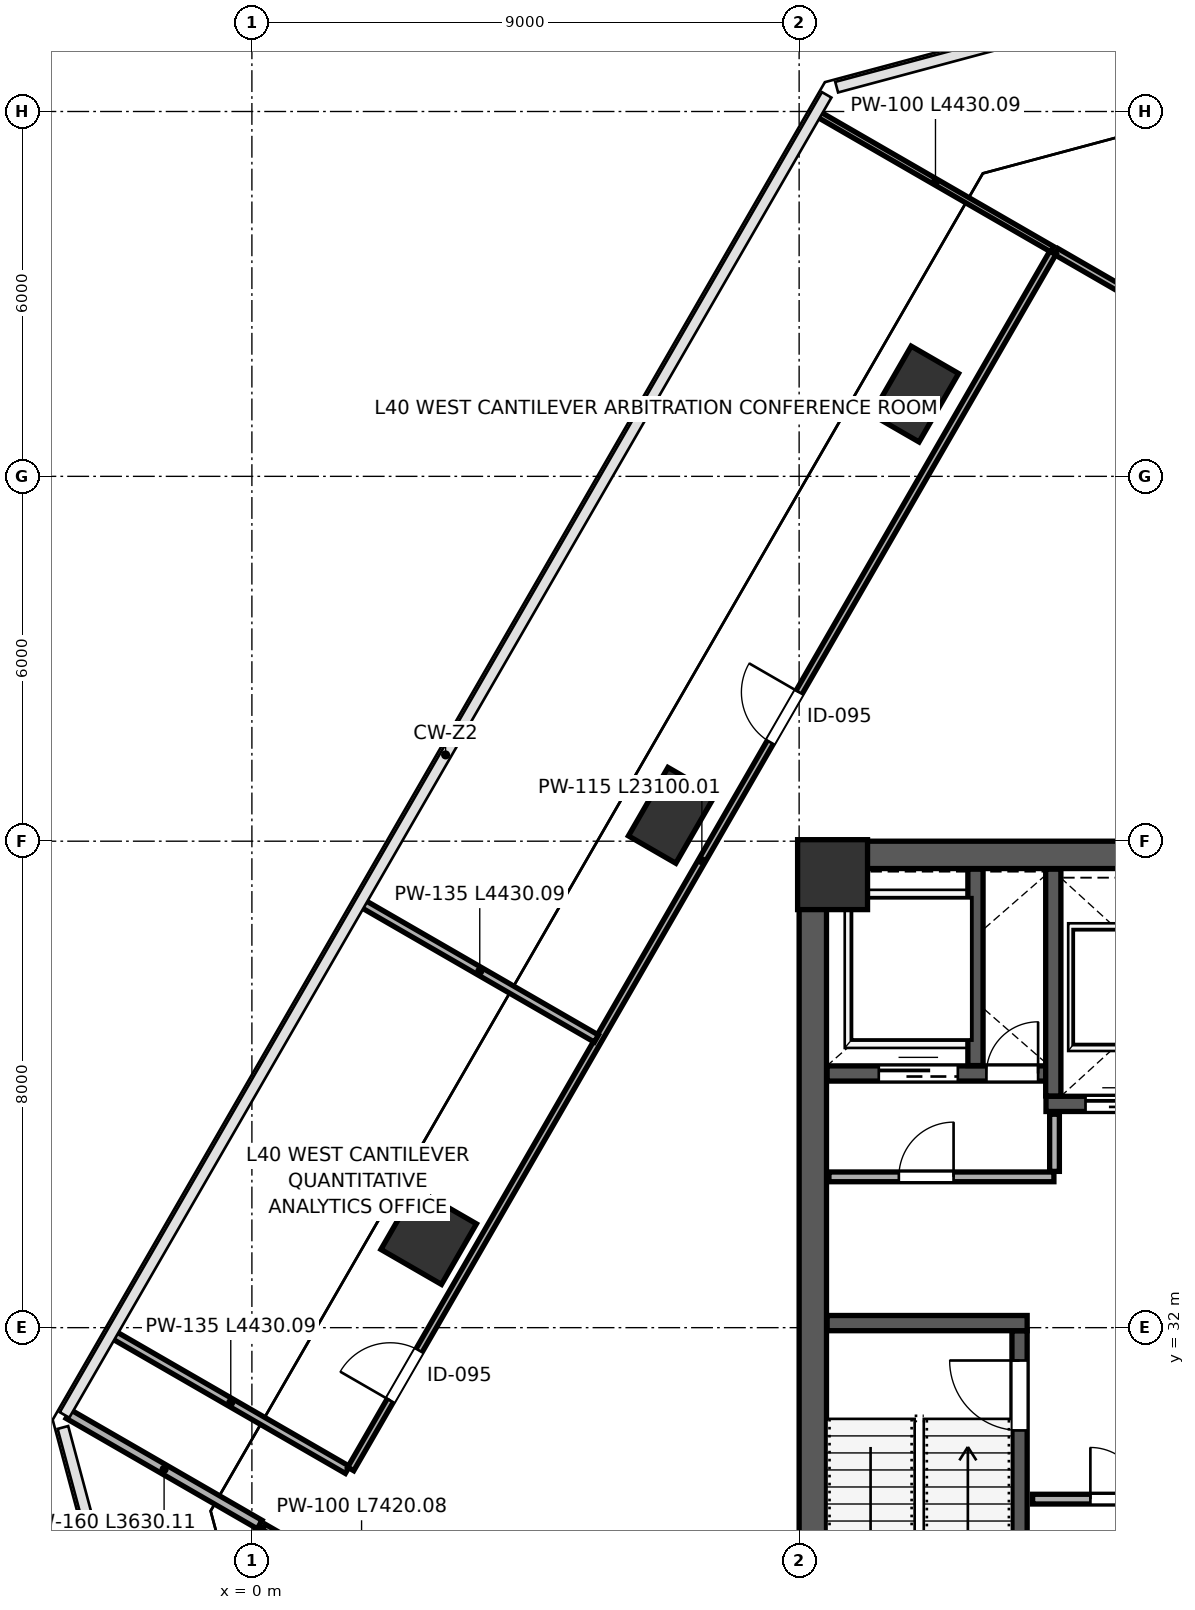
"""IFC4 building model, lengths in metres.
Left out: names, types, materials, properties, quantities, classifications, styles, units other than length and angle.
Written with IfcOpenShell. Run it as: python <this file> out.ifc"""

import sys

from ifc_helpers import new_model, si_unit, direction, frame, frame_2d, origin, origin_2d, place, context, subcontext, project, spatial, rectangle, extrude, source, transform, mapped, element, fill, save


model = new_model("IFC4")
c1 = context("Model", 3, precision=1e-05, world=origin(), true_north=direction((0.0, 1.0)))
c2 = subcontext(c1, "Body", "Model", "MODEL_VIEW")
j1 = project(units=[si_unit("LENGTHUNIT", "METRE"), si_unit("PLANEANGLEUNIT", "RADIAN")], contexts=[c1])
p1 = place(None, origin())
s1 = spatial("IfcSite", under=j1, at=p1, CompositionType="ELEMENT")
p2 = place(p1, origin())
s2 = spatial("IfcBuilding", under=s1, at=p2, CompositionType="ELEMENT")
p3 = place(p2, frame((0.0, 0.0, 179.2)))
s3 = spatial("IfcBuildingStorey", under=s2, at=p3, CompositionType="ELEMENT", Elevation=179.2)
m1 = source(origin(), c2, "Body", "SweptSolid", [
    extrude(rectangle(XDim=1.15, YDim=1.15, at=origin_2d()), origin(), (0.0, 0.0, 1.0), 4.198),
])
p4 = place(p3, frame((9.55, 39.45, 0.001), z_axis=(0.0, 0.0, 1.0), x_axis=(1.0, 0.0, 0.0)))
e1 = element("IfcColumn", 1, at=p4, inside=s3, PredefinedType="COLUMN", context=c2, shape_type="MappedRepresentation", body=[
    mapped(m1, transform((0.0, 0.0, 0.0), scale=1.0)),
])
m2 = source(origin(), c2, "Body", "SweptSolid", [
    extrude(rectangle(XDim=1.15, YDim=1.15, at=origin_2d()), origin(), (0.0, 0.0, 1.0), 4.198),
])
p5 = place(p3, frame((2.907, 33.497, 0.001), z_axis=(0.0, 0.0, 1.0), x_axis=(-0.866025403784, 0.5, 0.0)))
e2 = element("IfcColumn", 2, at=p5, inside=s3, PredefinedType="COLUMN", context=c2, shape_type="MappedRepresentation", body=[
    mapped(m2, transform((0.0, 0.0, 0.0), scale=1.0)),
])
m3 = source(origin(), c2, "Body", "SweptSolid", [
    extrude(rectangle(XDim=0.9, YDim=1.3, at=origin_2d()), origin(), (0.0, 0.0, 1.0), 4.198),
])
for number, where, z_axis, x_axis in (
    (3, (6.907, 40.425, 0.001), (0.0, 0.0, 1.0), (-0.866, 0.5, 0.0)),
    (4, (10.907, 47.353, 0.001), (0.0, 0.0, 1.0), (-0.866, 0.5, 0.0)),
):
    element("IfcColumn", number, at=place(p3, frame(where, z_axis=z_axis, x_axis=x_axis)), inside=s3, PredefinedType="PILASTER", context=c2, shape_type="MappedRepresentation", body=[
        mapped(m3, transform((0.0, 0.0, 0.0), scale=1.0)),
    ])
p6 = place(p3, frame((9.225, 24.45, 0.0), z_axis=(0.0, 0.0, 1.0), x_axis=(0.0, 1.0, 0.0)))
e5 = element("IfcWall", 5, at=p6, inside=s3, PredefinedType="SHEAR", context=c2, shape_type="SweptSolid", body=[
    extrude(rectangle(XDim=15.1, YDim=0.45, at=frame_2d((7.55, 0.0))), origin(), (0.0, 0.0, 1.0), 3.96),
])
p7 = place(p3, frame((9.0, 39.775, 0.0), z_axis=(0.0, 0.0, 1.0), x_axis=(1.0, 0.0, 0.0)))
e6 = element("IfcWall", 6, at=p7, inside=s3, PredefinedType="SHEAR", context=c2, shape_type="SweptSolid", body=[
    extrude(rectangle(XDim=18.0, YDim=0.45, at=frame_2d((9.0, 0.0))), origin(), (0.0, 0.0, 1.0), 3.96),
])
p8 = place(p3, frame((12.625, 24.46, 0.0), z_axis=(0.0, 0.0, 1.0), x_axis=(0.0, 1.0, 0.0)))
e7 = element("IfcWall", 7, at=p8, inside=s3, PredefinedType="SHEAR", context=c2, shape_type="SweptSolid", body=[
    extrude(rectangle(XDim=7.49, YDim=0.25, at=frame_2d((3.745, 0.0))), origin(), (0.0, 0.0, 1.0), 3.96),
])
p9 = place(p8, frame((5.85, 0.0, 0.0)))
e8 = element("IfcOpeningElement", 8, at=p9, cuts=e7, PredefinedType="OPENING", context=c2, shape_type="SweptSolid", body=[
    extrude(rectangle(XDim=1.15, YDim=2.2, at=frame_2d((0.575, 1.1))), frame((0.0, 0.135, 0.0), z_axis=(0.0, -1.0, 0.0), x_axis=(1.0, 0.0, 0.0)), (0.0, 0.0, 1.0), 0.27),
])
p10 = place(p3, frame((9.46, 32.075, 0.0), z_axis=(0.0, 0.0, 1.0), x_axis=(1.0, 0.0, 0.0)))
e9 = element("IfcWall", 9, at=p10, inside=s3, PredefinedType="SHEAR", context=c2, shape_type="SweptSolid", body=[
    extrude(rectangle(XDim=3.29, YDim=0.25, at=frame_2d((1.645, 0.0))), origin(), (0.0, 0.0, 1.0), 3.96),
])
p11 = place(p3, frame((9.46, 36.18, 0.0), z_axis=(0.0, 0.0, 1.0), x_axis=(1.0, 0.0, 0.0)))
e10 = element("IfcWall", 10, at=p11, inside=s3, PredefinedType="SHEAR", context=c2, shape_type="SweptSolid", body=[
    extrude(rectangle(XDim=3.79, YDim=0.25, at=frame_2d((1.895, 0.0))), origin(), (0.0, 0.0, 1.0), 3.96),
])
p12 = place(p11, frame((2.62, 0.0, 0.0)))
e11 = element("IfcOpeningElement", 11, at=p12, cuts=e10, PredefinedType="OPENING", context=c2, shape_type="SweptSolid", body=[
    extrude(rectangle(XDim=0.85, YDim=2.1, at=frame_2d((0.425, 1.05))), frame((0.0, 0.135, 0.0), z_axis=(0.0, -1.0, 0.0), x_axis=(1.0, 0.0, 0.0)), (0.0, 0.0, 1.0), 0.27),
])
p13 = place(p11, frame((0.85, 0.0, 0.0)))
e12 = element("IfcOpeningElement", 12, at=p13, cuts=e10, PredefinedType="OPENING", context=c2, shape_type="SweptSolid", body=[
    extrude(rectangle(XDim=1.3, YDim=2.25, at=frame_2d((0.65, 1.125))), frame((0.0, 0.135, 0.0), z_axis=(0.0, -1.0, 0.0), x_axis=(1.0, 0.0, 0.0)), (0.0, 0.0, 1.0), 0.27),
])
p14 = place(p3, frame((11.9, 36.31, 0.0), z_axis=(0.0, 0.0, 1.0), x_axis=(0.0, 1.0, 0.0)))
e13 = element("IfcWall", 13, at=p14, inside=s3, PredefinedType="SHEAR", context=c2, shape_type="SweptSolid", body=[
    extrude(rectangle(XDim=3.23, YDim=0.25, at=frame_2d((1.615, 0.0))), origin(), (0.0, 0.0, 1.0), 3.96),
])
p15 = place(p3, frame((13.06, 35.68, 0.0), z_axis=(0.0, 0.0, 1.0), x_axis=(1.0, 0.0, 0.0)))
e14 = element("IfcWall", 14, at=p15, inside=s3, PredefinedType="SHEAR", context=c2, shape_type="SweptSolid", body=[
    extrude(rectangle(XDim=4.25, YDim=0.25, at=frame_2d((2.125, 0.0))), origin(), (0.0, 0.0, 1.0), 3.96),
])
p16 = place(p15, frame((0.65, 0.0, 0.0)))
e15 = element("IfcOpeningElement", 15, at=p16, cuts=e14, PredefinedType="OPENING", context=c2, shape_type="SweptSolid", body=[
    extrude(rectangle(XDim=1.1, YDim=2.2, at=frame_2d((0.55, 1.1))), frame((0.0, 0.135, 0.0), z_axis=(0.0, -1.0, 0.0), x_axis=(1.0, 0.0, 0.0)), (0.0, 0.0, 1.0), 0.27),
])
p17 = place(p15, frame((2.65, 0.0, 0.0)))
e16 = element("IfcOpeningElement", 16, at=p17, cuts=e14, PredefinedType="OPENING", context=c2, shape_type="SweptSolid", body=[
    extrude(rectangle(XDim=1.1, YDim=2.2, at=frame_2d((0.55, 1.1))), frame((0.0, 0.135, 0.0), z_axis=(0.0, -1.0, 0.0), x_axis=(1.0, 0.0, 0.0)), (0.0, 0.0, 1.0), 0.27),
])
p18 = place(p3, frame((13.18, 35.81, 0.0), z_axis=(0.0, 0.0, 1.0), x_axis=(0.0, 1.0, 0.0)))
e17 = element("IfcWall", 17, at=p18, inside=s3, PredefinedType="SHEAR", context=c2, shape_type="SweptSolid", body=[
    extrude(rectangle(XDim=3.73, YDim=0.25, at=frame_2d((1.865, 0.0))), origin(), (0.0, 0.0, 1.0), 3.96),
])
p19 = place(p3, frame((9.49, 34.48, 0.0), z_axis=(0.0, 0.0, 1.0), x_axis=(1.0, 0.0, 0.0)))
e18 = element("IfcWall", 18, at=p19, inside=s3, PredefinedType="PARTITIONING", context=c2, shape_type="SweptSolid", body=[
    extrude(rectangle(XDim=3.7, YDim=0.16, at=frame_2d((1.85, 0.0))), origin(), (0.0, 0.0, 1.0), 3.96),
])
p20 = place(p19, frame((1.15, 0.0, 0.0)))
e19 = element("IfcOpeningElement", 19, at=p20, cuts=e18, PredefinedType="OPENING", context=c2, shape_type="SweptSolid", body=[
    extrude(rectangle(XDim=0.9, YDim=2.15, at=frame_2d((0.45, 1.075))), frame((0.0, 0.09, 0.0), z_axis=(0.0, -1.0, 0.0), x_axis=(1.0, 0.0, 0.0)), (0.0, 0.0, 1.0), 0.18),
])
p21 = place(p3, frame((13.2, 34.57, 0.0), z_axis=(0.0, 0.0, 1.0), x_axis=(0.0, 1.0, 0.0)))
e20 = element("IfcWall", 20, at=p21, inside=s3, PredefinedType="PARTITIONING", context=c2, shape_type="SweptSolid", body=[
    extrude(rectangle(XDim=0.94, YDim=0.16, at=frame_2d((0.47, 0.0))), origin(), (0.0, 0.0, 1.0), 3.96),
])
p22 = place(p3, frame((12.84, 29.18, 0.0), z_axis=(0.0, 0.0, 1.0), x_axis=(1.0, 0.0, 0.0)))
e21 = element("IfcWall", 21, at=p22, inside=s3, PredefinedType="PARTITIONING", context=c2, shape_type="SweptSolid", body=[
    extrude(rectangle(XDim=8.37, YDim=0.16, at=frame_2d((4.185, 0.0))), origin(), (0.0, 0.0, 1.0), 3.96),
])
p23 = place(p22, frame((0.95, 0.0, 0.0)))
e22 = element("IfcOpeningElement", 22, at=p23, cuts=e21, PredefinedType="OPENING", context=c2, shape_type="SweptSolid", body=[
    extrude(rectangle(XDim=0.85, YDim=2.1, at=frame_2d((0.425, 1.05))), frame((0.0, 0.09, 0.0), z_axis=(0.0, -1.0, 0.0), x_axis=(1.0, 0.0, 0.0)), (0.0, 0.0, 1.0), 0.18),
])
p24 = place(p22, frame((4.2, 0.0, 0.0)))
e23 = element("IfcOpeningElement", 23, at=p24, cuts=e21, PredefinedType="OPENING", context=c2, shape_type="SweptSolid", body=[
    extrude(rectangle(XDim=0.85, YDim=2.1, at=frame_2d((0.425, 1.05))), frame((0.0, 0.09, 0.0), z_axis=(0.0, -1.0, 0.0), x_axis=(1.0, 0.0, 0.0)), (0.0, 0.0, 1.0), 0.18),
])
p25 = place(p3, frame((-1.749, 25.432, 0.0), z_axis=(0.0, 0.0, 1.0), x_axis=(0.500013012896, 0.866017890655, 0.0)))
e24 = element("IfcWall", 24, at=p25, inside=s3, PredefinedType="PARTITIONING", context=c2, shape_type="SweptSolid", body=[
    extrude(rectangle(XDim=3.782, YDim=0.115, at=frame_2d((1.891, 0.0))), origin(), (0.0, 0.0, 1.0), 3.96),
])
p26 = place(p3, frame((-3.016, 30.577, 0.0), z_axis=(0.0, 0.0, 1.0), x_axis=(0.866011990707, -0.500023231413, 0.0)))
e25 = element("IfcWall", 25, at=p26, inside=s3, PredefinedType="PARTITIONING", context=c2, shape_type="SweptSolid", body=[
    extrude(rectangle(XDim=3.63, YDim=0.16, at=frame_2d((1.815, 0.0))), origin(), (0.0, 0.0, 1.0), 3.96),
])
p27 = place(p3, frame((0.197, 28.722, 0.0), z_axis=(0.0, 0.0, 1.0), x_axis=(0.866017374541, -0.5000139068, 0.0)))
e26 = element("IfcWall", 26, at=p27, inside=s3, PredefinedType="PARTITIONING", context=c2, shape_type="SweptSolid", body=[
    extrude(rectangle(XDim=7.42, YDim=0.1, at=frame_2d((3.71, 0.0))), origin(), (0.0, 0.0, 1.0), 3.96),
])
p28 = place(p27, frame((2.9, 0.0, 0.0)))
e27 = element("IfcOpeningElement", 27, at=p28, cuts=e26, PredefinedType="OPENING", context=c2, shape_type="SweptSolid", body=[
    extrude(rectangle(XDim=0.9, YDim=2.15, at=frame_2d((0.45, 1.075))), frame((0.0, 0.06, 0.0), z_axis=(0.0, -1.0, 0.0), x_axis=(1.0, 0.0, 0.0)), (0.0, 0.0, 1.0), 0.12),
])
p29 = place(p27, frame((5.0, 0.0, 0.0)))
e28 = element("IfcOpeningElement", 28, at=p29, cuts=e26, PredefinedType="OPENING", context=c2, shape_type="SweptSolid", body=[
    extrude(rectangle(XDim=0.95, YDim=2.15, at=frame_2d((0.475, 1.075))), frame((0.0, 0.06, 0.0), z_axis=(0.0, -1.0, 0.0), x_axis=(1.0, 0.0, 0.0)), (0.0, 0.0, 1.0), 0.12),
])
p30 = place(p3, frame((13.23, 49.696, 0.0), z_axis=(0.0, 0.0, 1.0), x_axis=(0.866026251752, -0.499998531275, 0.0)))
e29 = element("IfcWall", 29, at=p30, inside=s3, PredefinedType="PARTITIONING", context=c2, shape_type="SweptSolid", body=[
    extrude(rectangle(XDim=26.69, YDim=0.115, at=frame_2d((13.345, 0.0))), origin(), (0.0, 0.0, 1.0), 3.96),
])
p31 = place(p30, frame((2.1, 0.0, 0.0)))
e30 = element("IfcOpeningElement", 30, at=p31, cuts=e29, PredefinedType="OPENING", context=c2, shape_type="SweptSolid", body=[
    extrude(rectangle(XDim=0.95, YDim=2.15, at=frame_2d((0.475, 1.075))), frame((0.0, 0.067, 0.0), z_axis=(0.0, -1.0, 0.0), x_axis=(1.0, 0.0, 0.0)), (0.0, 0.0, 1.0), 0.135),
])
p32 = place(p30, frame((18.2, 0.0, 0.0)))
e31 = element("IfcOpeningElement", 31, at=p32, cuts=e29, PredefinedType="OPENING", context=c2, shape_type="SweptSolid", body=[
    extrude(rectangle(XDim=0.95, YDim=2.15, at=frame_2d((0.475, 1.075))), frame((0.0, 0.067, 0.0), z_axis=(0.0, -1.0, 0.0), x_axis=(1.0, 0.0, 0.0)), (0.0, 0.0, 1.0), 0.135),
])
p33 = place(p3, frame((-2.266, 31.876, 0.0), z_axis=(0.0, 0.0, 1.0), x_axis=(0.866026823135, -0.499997541604, 0.0)))
e32 = element("IfcWall", 32, at=p33, inside=s3, PredefinedType="PARTITIONING", context=c2, shape_type="SweptSolid", body=[
    extrude(rectangle(XDim=4.43, YDim=0.135, at=frame_2d((2.215, 0.0))), origin(), (0.0, 0.0, 1.0), 3.96),
])
p34 = place(p3, frame((1.625, 29.676, 0.0), z_axis=(0.0, 0.0, 1.0), x_axis=(0.500002707681, 0.866023840498, 0.0)))
e33 = element("IfcWall", 33, at=p34, inside=s3, PredefinedType="PARTITIONING", context=c2, shape_type="SweptSolid", body=[
    extrude(rectangle(XDim=23.1, YDim=0.115, at=frame_2d((11.55, 0.0))), origin(), (0.0, 0.0, 1.0), 3.96),
])
p35 = place(p34, frame((1.3, 0.0, 0.0)))
e34 = element("IfcOpeningElement", 34, at=p35, cuts=e33, PredefinedType="OPENING", context=c2, shape_type="SweptSolid", body=[
    extrude(rectangle(XDim=0.95, YDim=2.15, at=frame_2d((0.475, 1.075))), frame((0.0, 0.067, 0.0), z_axis=(0.0, -1.0, 0.0), x_axis=(1.0, 0.0, 0.0)), (0.0, 0.0, 1.0), 0.135),
])
p36 = place(p34, frame((13.8, 0.0, 0.0)))
e35 = element("IfcOpeningElement", 35, at=p36, cuts=e33, PredefinedType="OPENING", context=c2, shape_type="SweptSolid", body=[
    extrude(rectangle(XDim=0.95, YDim=2.15, at=frame_2d((0.475, 1.075))), frame((0.0, 0.067, 0.0), z_axis=(0.0, -1.0, 0.0), x_axis=(1.0, 0.0, 0.0)), (0.0, 0.0, 1.0), 0.135),
])
p37 = place(p3, frame((9.324, 51.951, 0.0), z_axis=(0.0, 0.0, 1.0), x_axis=(0.866036909293, -0.499980071345, 0.0)))
e36 = element("IfcWall", 36, at=p37, inside=s3, PredefinedType="PARTITIONING", context=c2, shape_type="SweptSolid", body=[
    extrude(rectangle(XDim=4.43, YDim=0.1, at=frame_2d((2.215, 0.0))), origin(), (0.0, 0.0, 1.0), 3.96),
])
p38 = place(p3, frame((1.829, 38.969, 0.0), z_axis=(0.0, 0.0, 1.0), x_axis=(0.866050685319, -0.499956208541, 0.0)))
e37 = element("IfcWall", 37, at=p38, inside=s3, PredefinedType="PARTITIONING", context=c2, shape_type="SweptSolid", body=[
    extrude(rectangle(XDim=4.43, YDim=0.135, at=frame_2d((2.215, 0.0))), origin(), (0.0, 0.0, 1.0), 3.195),
])
m4 = source(origin(), c2, "Body", "SweptSolid", [
    extrude(rectangle(XDim=1.15, YDim=2.2, at=frame_2d((0.575, 1.1))), frame((0.0, 0.025, 0.0), z_axis=(0.0, -1.0, 0.0), x_axis=(1.0, 0.0, 0.0)), (0.0, 0.0, 1.0), 0.05),
])
p39 = place(p9, origin())
e38 = element("IfcDoor", 38, at=p39, inside=s3, OperationType="SINGLE_SWING_RIGHT", PredefinedType="DOOR", context=c2, shape_type="MappedRepresentation", body=[
    mapped(m4, transform((0.0, 0.0, 0.0), scale=1.0)),
])
fill(e8, e38)
m5 = source(origin(), c2, "Body", "SweptSolid", [
    extrude(rectangle(XDim=0.85, YDim=2.1, at=frame_2d((0.425, 1.05))), frame((0.0, 0.025, 0.0), z_axis=(0.0, -1.0, 0.0), x_axis=(1.0, 0.0, 0.0)), (0.0, 0.0, 1.0), 0.05),
])
p40 = place(p12, origin())
e39 = element("IfcDoor", 39, at=p40, inside=s3, OperationType="SINGLE_SWING_RIGHT", PredefinedType="DOOR", context=c2, shape_type="MappedRepresentation", body=[
    mapped(m5, transform((0.0, 0.0, 0.0), scale=1.0)),
])
fill(e11, e39)
m6 = source(origin(), c2, "Body", "SweptSolid", [
    extrude(rectangle(XDim=1.1, YDim=2.2, at=frame_2d((0.55, 1.1))), frame((0.0, 0.025, 0.0), z_axis=(0.0, -1.0, 0.0), x_axis=(1.0, 0.0, 0.0)), (0.0, 0.0, 1.0), 0.05),
])
p41 = place(p16, origin())
e40 = element("IfcDoor", 40, at=p41, inside=s3, OperationType="SLIDING_TO_LEFT", PredefinedType="DOOR", context=c2, shape_type="MappedRepresentation", body=[
    mapped(m6, transform((0.0, 0.0, 0.0), scale=1.0)),
])
fill(e15, e40)
m7 = source(origin(), c2, "Body", "SweptSolid", [
    extrude(rectangle(XDim=1.3, YDim=2.25, at=frame_2d((0.65, 1.125))), frame((0.0, 0.025, 0.0), z_axis=(0.0, -1.0, 0.0), x_axis=(1.0, 0.0, 0.0)), (0.0, 0.0, 1.0), 0.05),
])
p42 = place(p13, origin())
e41 = element("IfcDoor", 41, at=p42, inside=s3, OperationType="SLIDING_TO_LEFT", PredefinedType="DOOR", context=c2, shape_type="MappedRepresentation", body=[
    mapped(m7, transform((0.0, 0.0, 0.0), scale=1.0)),
])
fill(e12, e41)
m8 = source(origin(), c2, "Body", "SweptSolid", [
    extrude(rectangle(XDim=0.9, YDim=2.15, at=frame_2d((0.45, 1.075))), frame((0.0, 0.025, 0.0), z_axis=(0.0, -1.0, 0.0), x_axis=(1.0, 0.0, 0.0)), (0.0, 0.0, 1.0), 0.05),
])
p43 = place(p20, origin())
e42 = element("IfcDoor", 42, at=p43, inside=s3, OperationType="SINGLE_SWING_RIGHT", PredefinedType="DOOR", context=c2, shape_type="MappedRepresentation", body=[
    mapped(m8, transform((0.0, 0.0, 0.0), scale=1.0)),
])
fill(e19, e42)
p44 = place(p23, origin())
e43 = element("IfcDoor", 43, at=p44, inside=s3, OperationType="SINGLE_SWING_LEFT", PredefinedType="DOOR", context=c2, shape_type="MappedRepresentation", body=[
    mapped(m5, transform((0.0, 0.0, 0.0), scale=1.0)),
])
fill(e22, e43)
m9 = source(origin(), c2, "Body", "SweptSolid", [
    extrude(rectangle(XDim=0.95, YDim=2.15, at=frame_2d((0.475, 1.075))), frame((0.0, 0.025, 0.0), z_axis=(0.0, -1.0, 0.0), x_axis=(1.0, 0.0, 0.0)), (0.0, 0.0, 1.0), 0.05),
])
p45 = place(p35, origin())
e44 = element("IfcDoor", 44, at=p45, inside=s3, OperationType="SINGLE_SWING_LEFT", PredefinedType="DOOR", context=c2, shape_type="MappedRepresentation", body=[
    mapped(m9, transform((0.0, 0.0, 0.0), scale=1.0)),
])
fill(e34, e44)
p46 = place(p36, origin())
e45 = element("IfcDoor", 45, at=p46, inside=s3, OperationType="SINGLE_SWING_RIGHT", PredefinedType="DOOR", context=c2, shape_type="MappedRepresentation", body=[
    mapped(m9, transform((0.0, 0.0, 0.0), scale=1.0)),
])
fill(e35, e45)
save(model, sys.argv[1])
